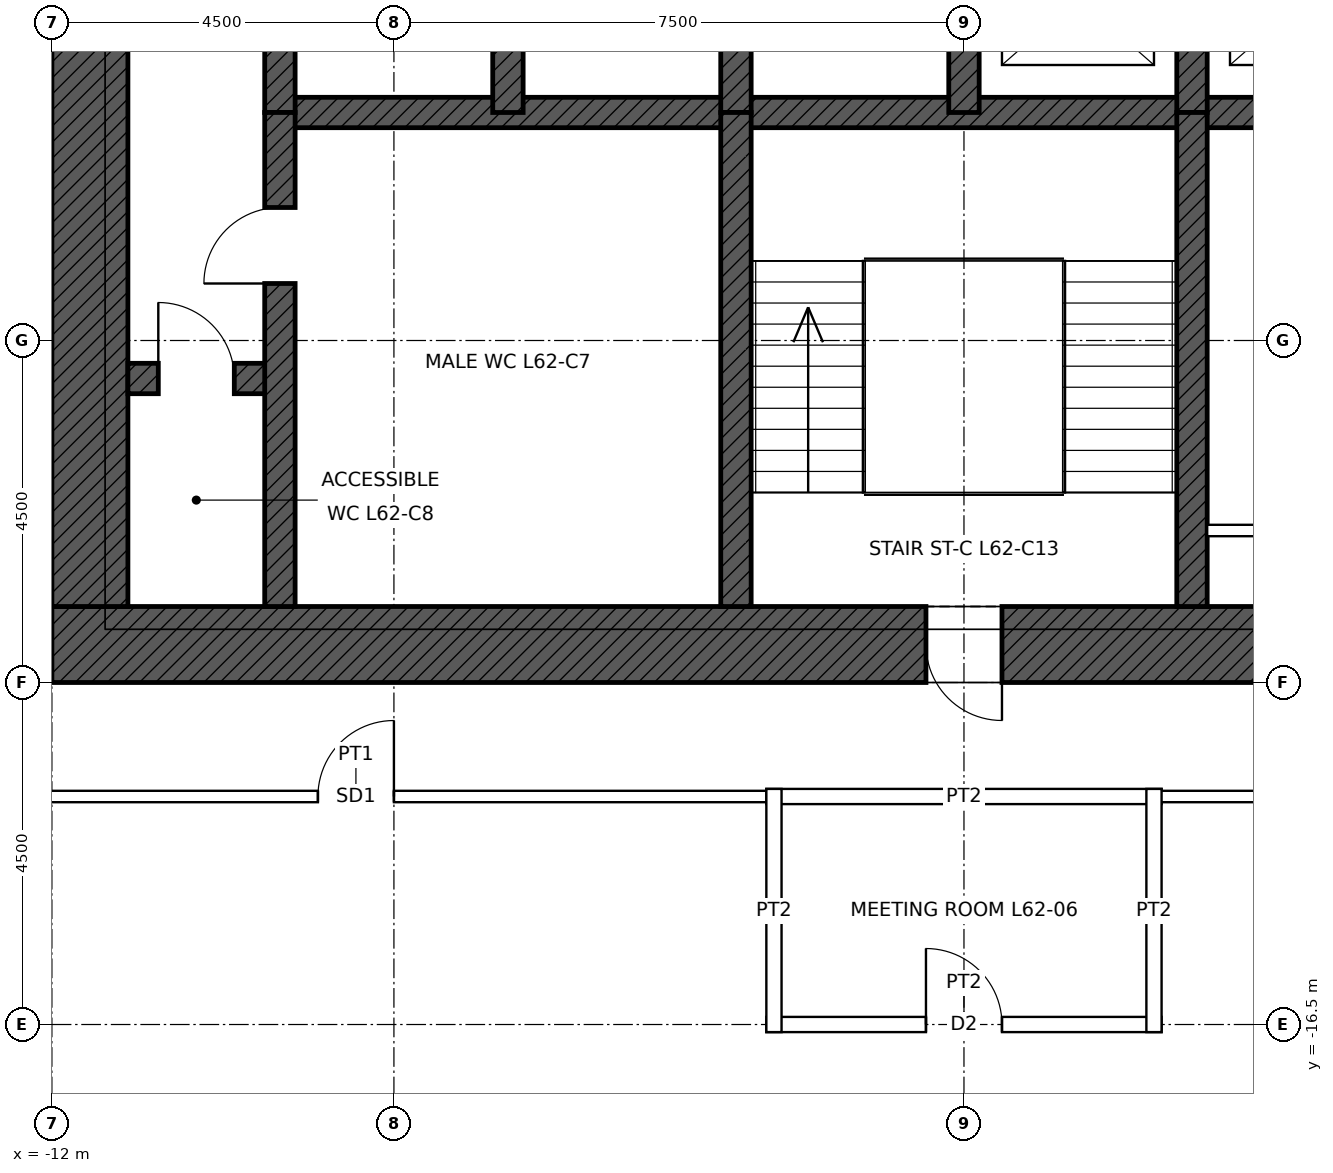
"""IFC4 building model, lengths in metres.
Left out: names, types, materials, properties, quantities, classifications, styles, units other than length and angle.
Written with IfcOpenShell. Run it as: python <this file> out.ifc"""

import sys

from ifc_helpers import new_model, si_unit, direction, frame, frame_2d, origin, place, context, subcontext, project, spatial, rectangle, extrude, element, fill, save


model = new_model("IFC4")
c1 = context("Model", 3, precision=1e-05, world=origin(), true_north=direction((0.0, 1.0)))
c2 = subcontext(c1, "Body", "Model", "MODEL_VIEW")
j1 = project(units=[si_unit("LENGTHUNIT", "METRE"), si_unit("PLANEANGLEUNIT", "RADIAN")], contexts=[c1])
p1 = place(None, origin())
s1 = spatial("IfcSite", under=j1, at=p1, CompositionType="ELEMENT")
p2 = place(p1, origin())
s2 = spatial("IfcBuilding", under=s1, at=p2, CompositionType="ELEMENT")
p3 = place(p2, frame((0.0, 0.0, 283.9)))
s3 = spatial("IfcBuildingStorey", under=s2, at=p3, CompositionType="ELEMENT", Elevation=283.9)
p4 = place(p3, frame((12.0, -11.5, 0.0), z_axis=(0.0, 0.0, 1.0), x_axis=(-1.0, 0.0, 0.0)))
e1 = element("IfcWall", 1, at=p4, inside=s3, PredefinedType="SHEAR", context=c2, shape_type="SweptSolid", body=[
    extrude(rectangle(XDim=24.0, YDim=1.0, at=frame_2d((12.0, 0.0))), origin(), (0.0, 0.0, 1.0), 4.0),
])
p5 = place(p4, frame((11.5, 0.0, 0.0)))
e2 = element("IfcOpeningElement", 2, at=p5, cuts=e1, PredefinedType="OPENING", context=c2, shape_type="SweptSolid", body=[
    extrude(rectangle(XDim=1.0, YDim=2.1, at=frame_2d((0.5, 1.05))), frame((0.0, 0.51, 0.0), z_axis=(0.0, -1.0, 0.0), x_axis=(1.0, 0.0, 0.0)), (0.0, 0.0, 1.0), 1.02),
])
p6 = place(p4, frame((1.0, 0.0, 0.0)))
e3 = element("IfcOpeningElement", 3, at=p6, cuts=e1, PredefinedType="OPENING", context=c2, shape_type="SweptSolid", body=[
    extrude(rectangle(XDim=1.0, YDim=2.4, at=frame_2d((0.5, 1.2))), frame((0.0, 0.51, 0.0), z_axis=(0.0, -1.0, 0.0), x_axis=(1.0, 0.0, 0.0)), (0.0, 0.0, 1.0), 1.02),
])
p7 = place(p3, frame((-11.5, -11.0, 0.0), z_axis=(0.0, 0.0, 1.0), x_axis=(0.0, 1.0, 0.0)))
e4 = element("IfcWall", 4, at=p7, inside=s3, PredefinedType="SHEAR", context=c2, shape_type="SweptSolid", body=[
    extrude(rectangle(XDim=22.0, YDim=1.0, at=frame_2d((11.0, 0.0))), origin(), (0.0, 0.0, 1.0), 4.0),
])
p8 = place(p7, frame((10.5, 0.0, 0.0)))
e5 = element("IfcOpeningElement", 5, at=p8, cuts=e4, PredefinedType="OPENING", context=c2, shape_type="SweptSolid", body=[
    extrude(rectangle(XDim=1.0, YDim=2.4, at=frame_2d((0.5, 1.2))), frame((0.0, 0.51, 0.0), z_axis=(0.0, -1.0, 0.0), x_axis=(1.0, 0.0, 0.0)), (0.0, 0.0, 1.0), 1.02),
])
p9 = place(p3, frame((-9.0, -4.5, 0.0), z_axis=(0.0, 0.0, 1.0), x_axis=(1.0, 0.0, 0.0)))
e6 = element("IfcWall", 6, at=p9, inside=s3, PredefinedType="SHEAR", context=c2, shape_type="SweptSolid", body=[
    extrude(rectangle(XDim=18.0, YDim=0.4, at=frame_2d((9.0, 0.0))), origin(), (0.0, 0.0, 1.0), 4.0),
])
p10 = place(p3, frame((-11.0, -8.0, 0.0), z_axis=(0.0, 0.0, 1.0), x_axis=(1.0, 0.0, 0.0)))
e7 = element("IfcWall", 7, at=p10, inside=s3, PredefinedType="SHEAR", context=c2, shape_type="SweptSolid", body=[
    extrude(rectangle(XDim=2.0, YDim=0.4, at=frame_2d((1.0, 0.0))), origin(), (0.0, 0.0, 1.0), 4.0),
])
p11 = place(p10, frame((0.4, 0.0, 0.0)))
e8 = element("IfcOpeningElement", 8, at=p11, cuts=e7, PredefinedType="OPENING", context=c2, shape_type="SweptSolid", body=[
    extrude(rectangle(XDim=1.0, YDim=2.1, at=frame_2d((0.5, 1.05))), frame((0.0, 0.21, 0.0), z_axis=(0.0, -1.0, 0.0), x_axis=(1.0, 0.0, 0.0)), (0.0, 0.0, 1.0), 0.42),
])
for number, where, z_axis, x_axis in (
    (9, (-9.0, -4.5, 0.0), (0.0, 0.0, 1.0), (0.0, 1.0, 0.0)),
    (10, (-6.0, -4.5, 0.0), (0.0, 0.0, 1.0), (0.0, 1.0, 0.0)),
    (11, (-3.0, -4.5, 0.0), (0.0, 0.0, 1.0), (0.0, 1.0, 0.0)),
    (12, (0.0, -4.5, 0.0), (0.0, 0.0, 1.0), (0.0, 1.0, 0.0)),
    (13, (3.0, -4.5, 0.0), (0.0, 0.0, 1.0), (0.0, 1.0, 0.0)),
):
    element("IfcWall", number, at=place(p3, frame(where, z_axis=z_axis, x_axis=x_axis)), inside=s3, PredefinedType="SHEAR", context=c2, shape_type="SweptSolid", body=[
        extrude(rectangle(XDim=3.0, YDim=0.4, at=frame_2d((1.5, 0.0))), origin(), (0.0, 0.0, 1.0), 4.0),
    ])
p12 = place(p3, frame((-9.0, -11.0, 0.0), z_axis=(0.0, 0.0, 1.0), x_axis=(0.0, 1.0, 0.0)))
e14 = element("IfcWall", 14, at=p12, inside=s3, PredefinedType="SHEAR", context=c2, shape_type="SweptSolid", body=[
    extrude(rectangle(XDim=6.5, YDim=0.4, at=frame_2d((3.25, 0.0))), origin(), (0.0, 0.0, 1.0), 4.0),
])
p13 = place(p12, frame((4.25, 0.0, 0.0)))
e15 = element("IfcOpeningElement", 15, at=p13, cuts=e14, PredefinedType="OPENING", context=c2, shape_type="SweptSolid", body=[
    extrude(rectangle(XDim=1.0, YDim=2.1, at=frame_2d((0.5, 1.05))), frame((0.0, 0.21, 0.0), z_axis=(0.0, -1.0, 0.0), x_axis=(1.0, 0.0, 0.0)), (0.0, 0.0, 1.0), 0.42),
])
for number, where, z_axis, x_axis in (
    (16, (-3.0, -11.0, 0.0), (0.0, 0.0, 1.0), (0.0, 1.0, 0.0)),
    (17, (3.0, -11.0, 0.0), (0.0, 0.0, 1.0), (0.0, 1.0, 0.0)),
):
    element("IfcWall", number, at=place(p3, frame(where, z_axis=z_axis, x_axis=x_axis)), inside=s3, PredefinedType="SHEAR", context=c2, shape_type="SweptSolid", body=[
        extrude(rectangle(XDim=6.5, YDim=0.4, at=frame_2d((3.25, 0.0))), origin(), (0.0, 0.0, 1.0), 4.0),
    ])
p14 = place(p3, frame((-2.6, -16.5, 0.0), z_axis=(0.0, 0.0, 1.0), x_axis=(1.0, 0.0, 0.0)))
e18 = element("IfcWall", 18, at=p14, inside=s3, PredefinedType="PARTITIONING", context=c2, shape_type="SweptSolid", body=[
    extrude(rectangle(XDim=5.2, YDim=0.2, at=frame_2d((2.6, 0.0))), origin(), (0.0, 0.0, 1.0), 3.85),
])
p15 = place(p14, frame((2.1, 0.0, 0.0)))
e19 = element("IfcOpeningElement", 19, at=p15, cuts=e18, PredefinedType="OPENING", context=c2, shape_type="SweptSolid", body=[
    extrude(rectangle(XDim=1.0, YDim=2.1, at=frame_2d((0.5, 1.05))), frame((0.0, 0.11, 0.0), z_axis=(0.0, -1.0, 0.0), x_axis=(1.0, 0.0, 0.0)), (0.0, 0.0, 1.0), 0.22),
])
p16 = place(p3, frame((-13.575, -13.5, 0.0), z_axis=(0.0, 0.0, 1.0), x_axis=(1.0, 0.0, 0.0)))
e20 = element("IfcWall", 20, at=p16, inside=s3, PredefinedType="PARTITIONING", context=c2, shape_type="SweptSolid", body=[
    extrude(rectangle(XDim=11.15, YDim=0.15, at=frame_2d((5.575, 0.0))), origin(), (0.0, 0.0, 1.0), 3.85),
])
p17 = place(p16, frame((5.075, 0.0, 0.0)))
e21 = element("IfcOpeningElement", 21, at=p17, cuts=e20, PredefinedType="OPENING", context=c2, shape_type="SweptSolid", body=[
    extrude(rectangle(XDim=1.0, YDim=2.4, at=frame_2d((0.5, 1.2))), frame((0.0, 0.085, 0.0), z_axis=(0.0, -1.0, 0.0), x_axis=(1.0, 0.0, 0.0)), (0.0, 0.0, 1.0), 0.17),
])
p18 = place(p3, frame((-2.6, -13.5, 0.0), z_axis=(0.0, 0.0, 1.0), x_axis=(1.0, 0.0, 0.0)))
e22 = element("IfcWall", 22, at=p18, inside=s3, PredefinedType="PARTITIONING", context=c2, shape_type="SweptSolid", body=[
    extrude(rectangle(XDim=5.2, YDim=0.2, at=frame_2d((2.6, 0.0))), origin(), (0.0, 0.0, 1.0), 3.85),
])
p19 = place(p3, frame((2.425, -13.5, 0.0), z_axis=(0.0, 0.0, 1.0), x_axis=(1.0, 0.0, 0.0)))
e23 = element("IfcWall", 23, at=p19, inside=s3, PredefinedType="PARTITIONING", context=c2, shape_type="SweptSolid", body=[
    extrude(rectangle(XDim=11.15, YDim=0.15, at=frame_2d((5.575, 0.0))), origin(), (0.0, 0.0, 1.0), 3.85),
])
for number, where, z_axis, x_axis in (
    (24, (-2.5, -16.6, 0.0), (0.0, 0.0, 1.0), (0.0, 1.0, 0.0)),
    (25, (2.5, -16.6, 0.0), (0.0, 0.0, 1.0), (0.0, 1.0, 0.0)),
):
    element("IfcWall", number, at=place(p3, frame(where, z_axis=z_axis, x_axis=x_axis)), inside=s3, PredefinedType="PARTITIONING", context=c2, shape_type="SweptSolid", body=[
        extrude(rectangle(XDim=3.2, YDim=0.2, at=frame_2d((1.6, 0.0))), origin(), (0.0, 0.0, 1.0), 3.85),
    ])
p20 = place(p3, frame((3.2, -10.0, 0.0), z_axis=(0.0, 0.0, 1.0), x_axis=(1.0, 0.0, 0.0)))
e26 = element("IfcWall", 26, at=p20, inside=s3, PredefinedType="PARTITIONING", context=c2, shape_type="SweptSolid", body=[
    extrude(rectangle(XDim=5.6, YDim=0.15, at=frame_2d((2.8, 0.0))), origin(), (0.0, 0.0, 1.0), 3.75),
])
p21 = place(p20, frame((2.3, 0.0, 0.0)))
e27 = element("IfcOpeningElement", 27, at=p21, cuts=e26, PredefinedType="OPENING", context=c2, shape_type="SweptSolid", body=[
    extrude(rectangle(XDim=1.0, YDim=2.1, at=frame_2d((0.5, 1.05))), frame((0.0, 0.085, 0.0), z_axis=(0.0, -1.0, 0.0), x_axis=(1.0, 0.0, 0.0)), (0.0, 0.0, 1.0), 0.17),
])
p22 = place(p5, origin())
e28 = element("IfcDoor", 28, at=p22, inside=s3, OperationType="SINGLE_SWING_LEFT", PredefinedType="DOOR", context=c2, shape_type="SweptSolid", body=[
    extrude(rectangle(XDim=1.0, YDim=2.1, at=frame_2d((0.5, 1.05))), frame((0.0, 0.485, 0.0), z_axis=(0.0, -1.0, 0.0), x_axis=(1.0, 0.0, 0.0)), (0.0, 0.0, 1.0), 0.05),
])
fill(e2, e28)
p23 = place(p13, origin())
e29 = element("IfcDoor", 29, at=p23, inside=s3, OperationType="SINGLE_SWING_LEFT", PredefinedType="DOOR", context=c2, shape_type="SweptSolid", body=[
    extrude(rectangle(XDim=1.0, YDim=2.1, at=frame_2d((0.5, 1.05))), frame((0.0, 0.025, 0.0), z_axis=(0.0, -1.0, 0.0), x_axis=(1.0, 0.0, 0.0)), (0.0, 0.0, 1.0), 0.05),
])
fill(e15, e29)
p24 = place(p11, origin())
e30 = element("IfcDoor", 30, at=p24, inside=s3, OperationType="SINGLE_SWING_LEFT", PredefinedType="DOOR", context=c2, shape_type="SweptSolid", body=[
    extrude(rectangle(XDim=1.0, YDim=2.1, at=frame_2d((0.5, 1.05))), frame((0.0, 0.025, 0.0), z_axis=(0.0, -1.0, 0.0), x_axis=(1.0, 0.0, 0.0)), (0.0, 0.0, 1.0), 0.05),
])
fill(e8, e30)
p25 = place(p15, origin())
e31 = element("IfcDoor", 31, at=p25, inside=s3, OperationType="SINGLE_SWING_LEFT", PredefinedType="DOOR", context=c2, shape_type="SweptSolid", body=[
    extrude(rectangle(XDim=1.0, YDim=2.1, at=frame_2d((0.5, 1.05))), frame((0.0, 0.025, 0.0), z_axis=(0.0, -1.0, 0.0), x_axis=(1.0, 0.0, 0.0)), (0.0, 0.0, 1.0), 0.05),
])
fill(e19, e31)
p26 = place(p17, origin())
e32 = element("IfcDoor", 32, at=p26, inside=s3, OperationType="SINGLE_SWING_RIGHT", PredefinedType="DOOR", context=c2, shape_type="SweptSolid", body=[
    extrude(rectangle(XDim=1.0, YDim=2.4, at=frame_2d((0.5, 1.2))), frame((0.0, 0.025, 0.0), z_axis=(0.0, -1.0, 0.0), x_axis=(1.0, 0.0, 0.0)), (0.0, 0.0, 1.0), 0.05),
])
fill(e21, e32)
save(model, sys.argv[1])
